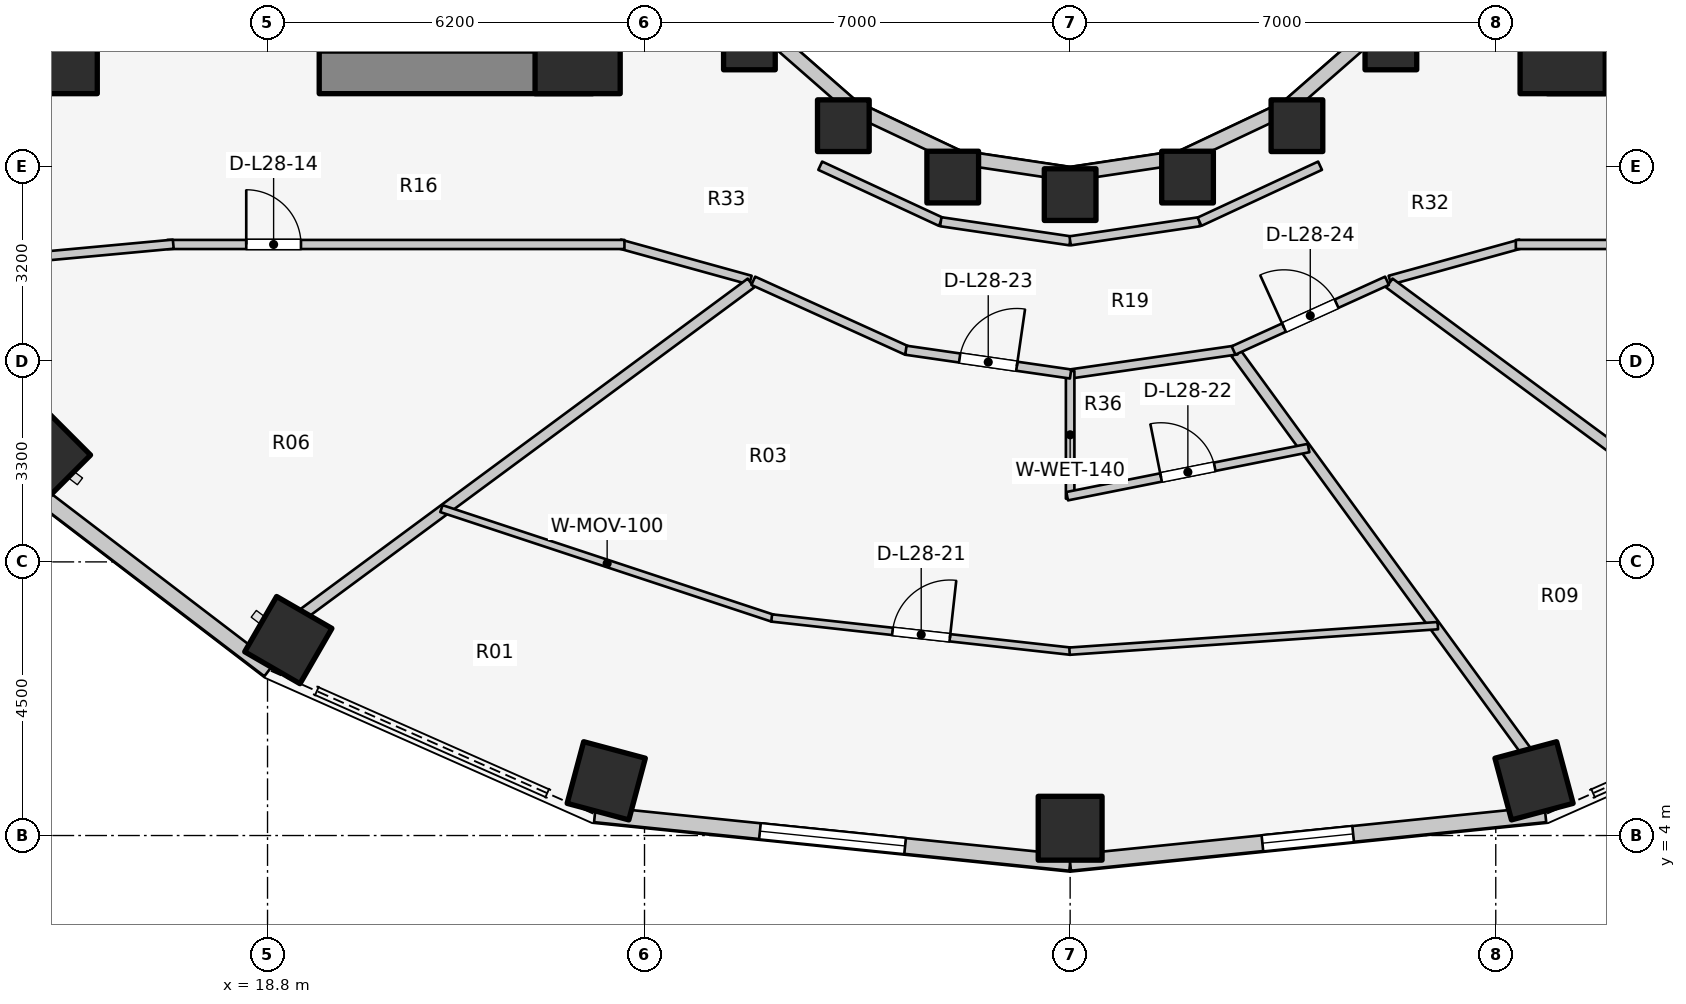
"""IFC4 building model, lengths in metres.
Left out: names, types, materials, properties, quantities, classifications, styles, units other than length and angle.
Written with IfcOpenShell. Run it as: python <this file> out.ifc"""

import sys

from ifc_helpers import new_model, si_unit, direction, frame, frame_2d, origin, origin_2d, place, context, subcontext, project, spatial, rectangle, extrude, element, fill, save


model = new_model("IFC4")
c1 = context("Model", 3, precision=1e-05, world=origin(), true_north=direction((0.0, 1.0)))
c2 = subcontext(c1, "Body", "Model", "MODEL_VIEW")
j1 = project(units=[si_unit("LENGTHUNIT", "METRE"), si_unit("PLANEANGLEUNIT", "RADIAN")], contexts=[c1])
p1 = place(None, origin())
s1 = spatial("IfcSite", under=j1, at=p1, CompositionType="ELEMENT")
p2 = place(p1, origin())
s2 = spatial("IfcBuilding", under=s1, at=p2, CompositionType="ELEMENT")
p3 = place(p2, frame((0.0, 0.0, 94.9)))
s3 = spatial("IfcBuildingStorey", under=s2, at=p3, CompositionType="ELEMENT", Elevation=94.9)
for number, where, z_axis, x_axis in (
    (1, (19.65, 16.55, 0.0), (0.0, 0.0, 1.0), (1.0, 0.0, 0.0)),
    (2, (39.85, 16.55, 0.0), (0.0, 0.0, 1.0), (1.0, 0.0, 0.0)),
):
    element("IfcWall", number, at=place(p3, frame(where, z_axis=z_axis, x_axis=x_axis)), inside=s3, PredefinedType="SHEAR", context=c2, shape_type="SweptSolid", body=[
        extrude(rectangle(XDim=4.5, YDim=0.7, at=frame_2d((2.25, 0.0))), origin(), (0.0, 0.0, 1.0), 3.1),
    ])
for number, where, z_axis, x_axis in (
    (3, (15.3, 16.9, 0.0), (0.0, 0.0, 1.0), (1.0, 0.0, 0.0)),
    (4, (23.9, 16.9, 0.0), (0.0, 0.0, 1.0), (1.0, 0.0, 0.0)),
    (5, (40.1, 16.9, 0.0), (0.0, 0.0, 1.0), (1.0, 0.0, 0.0)),
):
    element("IfcColumn", number, at=place(p3, frame(where, z_axis=z_axis, x_axis=x_axis)), inside=s3, PredefinedType="COLUMN", context=c2, shape_type="SweptSolid", body=[
        extrude(rectangle(XDim=1.4, YDim=1.4, at=origin_2d()), origin(), (0.0, 0.0, 1.0), 3.1),
    ])
p4 = place(p3, frame((26.725, 17.018, 0.0), z_axis=(0.0, 0.0, 1.0), x_axis=(1.0, 0.0, 0.0)))
e6 = element("IfcColumn", 6, at=p4, inside=s3, PredefinedType="COLUMN", context=c2, shape_type="SweptSolid", body=[
    extrude(rectangle(XDim=0.85, YDim=0.85, at=origin_2d()), origin(), (0.0, 0.0, 1.0), 3.1),
])
p5 = place(p3, frame((15.147, 10.257, 0.0), z_axis=(0.0, 0.0, 1.0), x_axis=(-0.707106781187, -0.707106781187, 0.0)))
e7 = element("IfcColumn", 7, at=p5, inside=s3, PredefinedType="COLUMN", context=c2, shape_type="SweptSolid", body=[
    extrude(rectangle(XDim=1.05, YDim=1.05, at=origin_2d()), origin(), (0.0, 0.0, 1.0), 3.1),
])
p6 = place(p3, frame((28.27, 15.673, 0.0), z_axis=(0.0, 0.0, 1.0), x_axis=(1.0, 0.0, 0.0)))
e8 = element("IfcColumn", 8, at=p6, inside=s3, PredefinedType="COLUMN", context=c2, shape_type="SweptSolid", body=[
    extrude(rectangle(XDim=0.85, YDim=0.85, at=origin_2d()), origin(), (0.0, 0.0, 1.0), 3.1),
])
p7 = place(p3, frame((19.142, 7.214, 0.0), z_axis=(0.0, 0.0, 1.0), x_axis=(-0.5, -0.866025403784, 0.0)))
e9 = element("IfcColumn", 9, at=p7, inside=s3, PredefinedType="COLUMN", context=c2, shape_type="SweptSolid", body=[
    extrude(rectangle(XDim=1.05, YDim=1.05, at=origin_2d()), origin(), (0.0, 0.0, 1.0), 3.1),
])
p8 = place(p3, frame((30.069, 14.828, 0.0), z_axis=(0.0, 0.0, 1.0), x_axis=(1.0, 0.0, 0.0)))
e10 = element("IfcColumn", 10, at=p8, inside=s3, PredefinedType="COLUMN", context=c2, shape_type="SweptSolid", body=[
    extrude(rectangle(XDim=0.85, YDim=0.85, at=origin_2d()), origin(), (0.0, 0.0, 1.0), 3.1),
])
p9 = place(p3, frame((24.371, 4.9, 0.0), z_axis=(0.0, 0.0, 1.0), x_axis=(-0.258819045103, -0.965925826289, 0.0)))
e11 = element("IfcColumn", 11, at=p9, inside=s3, PredefinedType="COLUMN", context=c2, shape_type="SweptSolid", body=[
    extrude(rectangle(XDim=1.05, YDim=1.05, at=origin_2d()), origin(), (0.0, 0.0, 1.0), 3.1),
])
p10 = place(p3, frame((32.0, 14.54, 0.0), z_axis=(0.0, 0.0, 1.0), x_axis=(1.0, 0.0, 0.0)))
e12 = element("IfcColumn", 12, at=p10, inside=s3, PredefinedType="COLUMN", context=c2, shape_type="SweptSolid", body=[
    extrude(rectangle(XDim=0.85, YDim=0.85, at=origin_2d()), origin(), (0.0, 0.0, 1.0), 3.1),
])
p11 = place(p3, frame((32.0, 4.12, 0.0), z_axis=(0.0, 0.0, 1.0), x_axis=(0.0, -1.0, 0.0)))
e13 = element("IfcColumn", 13, at=p11, inside=s3, PredefinedType="COLUMN", context=c2, shape_type="SweptSolid", body=[
    extrude(rectangle(XDim=1.05, YDim=1.05, at=origin_2d()), origin(), (0.0, 0.0, 1.0), 3.1),
])
p12 = place(p3, frame((33.931, 14.828, 0.0), z_axis=(0.0, 0.0, 1.0), x_axis=(1.0, 0.0, 0.0)))
e14 = element("IfcColumn", 14, at=p12, inside=s3, PredefinedType="COLUMN", context=c2, shape_type="SweptSolid", body=[
    extrude(rectangle(XDim=0.85, YDim=0.85, at=origin_2d()), origin(), (0.0, 0.0, 1.0), 3.1),
])
p13 = place(p3, frame((39.629, 4.9, 0.0), z_axis=(0.0, 0.0, 1.0), x_axis=(0.258819045103, -0.965925826289, 0.0)))
e15 = element("IfcColumn", 15, at=p13, inside=s3, PredefinedType="COLUMN", context=c2, shape_type="SweptSolid", body=[
    extrude(rectangle(XDim=1.05, YDim=1.05, at=origin_2d()), origin(), (0.0, 0.0, 1.0), 3.1),
])
for number, where, z_axis, x_axis in (
    (16, (35.73, 15.673, 0.0), (0.0, 0.0, 1.0), (1.0, 0.0, 0.0)),
    (17, (37.275, 17.018, 0.0), (0.0, 0.0, 1.0), (1.0, 0.0, 0.0)),
):
    element("IfcColumn", number, at=place(p3, frame(where, z_axis=z_axis, x_axis=x_axis)), inside=s3, PredefinedType="COLUMN", context=c2, shape_type="SweptSolid", body=[
        extrude(rectangle(XDim=0.85, YDim=0.85, at=origin_2d()), origin(), (0.0, 0.0, 1.0), 3.1),
    ])
p14 = place(p3, frame((26.965, 17.258, 0.0), z_axis=(0.0, 0.0, 1.0), x_axis=(0.752576694707, -0.658504607869, 0.0)))
e18 = element("IfcWall", 18, at=p14, inside=s3, PredefinedType="STANDARD", context=c2, shape_type="SweptSolid", body=[
    extrude(rectangle(XDim=1.959, YDim=0.23, at=frame_2d((0.98, 0.0))), origin(), (0.0, 0.0, 1.0), 2.16),
])
p15 = place(p3, frame((28.44, 15.968, 0.0), z_axis=(0.0, 0.0, 1.0), x_axis=(0.904179699603, -0.427152280606, 0.0)))
e19 = element("IfcWall", 19, at=p15, inside=s3, PredefinedType="STANDARD", context=c2, shape_type="SweptSolid", body=[
    extrude(rectangle(XDim=1.899, YDim=0.23, at=frame_2d((0.95, 0.0))), origin(), (0.0, 0.0, 1.0), 2.16),
])
for number, where, z_axis, x_axis in (
    (20, (30.157, 15.157, 0.0), (0.0, 0.0, 1.0), (0.989, -0.149, 0.0)),
    (21, (32.0, 14.88, 0.0), (0.0, 0.0, 1.0), (0.989, 0.149, 0.0)),
):
    element("IfcWall", number, at=place(p3, frame(where, z_axis=z_axis, x_axis=x_axis)), inside=s3, PredefinedType="STANDARD", context=c2, shape_type="SweptSolid", body=[
        extrude(rectangle(XDim=1.864, YDim=0.23, at=frame_2d((0.932, 0.0))), origin(), (0.0, 0.0, 1.0), 2.16),
    ])
p16 = place(p3, frame((33.843, 15.157, 0.0), z_axis=(0.0, 0.0, 1.0), x_axis=(0.904179699603, 0.427152280606, 0.0)))
e22 = element("IfcWall", 22, at=p16, inside=s3, PredefinedType="STANDARD", context=c2, shape_type="SweptSolid", body=[
    extrude(rectangle(XDim=1.899, YDim=0.23, at=frame_2d((0.95, 0.0))), origin(), (0.0, 0.0, 1.0), 2.16),
])
p17 = place(p3, frame((35.56, 15.968, 0.0), z_axis=(0.0, 0.0, 1.0), x_axis=(0.752576694707, 0.658504607869, 0.0)))
e23 = element("IfcWall", 23, at=p17, inside=s3, PredefinedType="STANDARD", context=c2, shape_type="SweptSolid", body=[
    extrude(rectangle(XDim=1.959, YDim=0.23, at=frame_2d((0.98, 0.0))), origin(), (0.0, 0.0, 1.0), 2.16),
])
p18 = place(p3, frame((14.734, 9.847, 0.0), z_axis=(0.0, 0.0, 1.0), x_axis=(0.794809810864, -0.606858603427, 0.0)))
e24 = element("IfcWall", 24, at=p18, inside=s3, PredefinedType="STANDARD", context=c2, shape_type="SweptSolid", body=[
    extrude(rectangle(XDim=5.149, YDim=0.26, at=frame_2d((2.575, 0.0))), origin(), (0.0, 0.0, 1.0), 2.85),
])
p19 = place(p3, frame((24.184, 4.349, 0.0), z_axis=(0.0, 0.0, 1.0), x_axis=(0.994821390558, -0.101638579726, 0.0)))
e25 = element("IfcWall", 25, at=p19, inside=s3, PredefinedType="STANDARD", context=c2, shape_type="SweptSolid", body=[
    extrude(rectangle(XDim=7.857, YDim=0.26, at=frame_2d((3.929, 0.0))), origin(), (0.0, 0.0, 1.0), 2.85),
])
p20 = place(p19, frame((2.729, 0.0, 0.75)))
e26 = element("IfcOpeningElement", 26, at=p20, cuts=e25, PredefinedType="OPENING", context=c2, shape_type="SweptSolid", body=[
    extrude(rectangle(XDim=2.4, YDim=1.7, at=frame_2d((1.2, 0.85))), frame((0.0, 0.14, 0.0), z_axis=(0.0, -1.0, 0.0), x_axis=(1.0, 0.0, 0.0)), (0.0, 0.0, 1.0), 0.28),
])
p21 = place(p3, frame((32.0, 3.551, 0.0), z_axis=(0.0, 0.0, 1.0), x_axis=(0.994821390558, 0.101638579726, 0.0)))
e27 = element("IfcWall", 27, at=p21, inside=s3, PredefinedType="STANDARD", context=c2, shape_type="SweptSolid", body=[
    extrude(rectangle(XDim=7.857, YDim=0.26, at=frame_2d((3.929, 0.0))), origin(), (0.0, 0.0, 1.0), 2.85),
])
p22 = place(p21, frame((3.178, 0.0, 0.75)))
e28 = element("IfcOpeningElement", 28, at=p22, cuts=e27, PredefinedType="OPENING", context=c2, shape_type="SweptSolid", body=[
    extrude(rectangle(XDim=1.5, YDim=1.6, at=frame_2d((0.75, 0.8))), frame((0.0, 0.14, 0.0), z_axis=(0.0, -1.0, 0.0), x_axis=(1.0, 0.0, 0.0)), (0.0, 0.0, 1.0), 0.28),
])
p23 = place(p3, frame((27.89, 15.015, 0.0), z_axis=(0.0, 0.0, 1.0), x_axis=(0.906943449489, -0.421252393975, 0.0)))
e29 = element("IfcWall", 29, at=p23, inside=s3, PredefinedType="PARTITIONING", context=c2, shape_type="SweptSolid", body=[
    extrude(rectangle(XDim=2.186, YDim=0.15, at=frame_2d((1.093, 0.0))), origin(), (0.0, 0.0, 1.0), 2.272),
])
for number, where, z_axis, x_axis in (
    (30, (29.873, 14.094, 0.0), (0.0, 0.0, 1.0), (0.989, -0.146, 0.0)),
    (31, (32.0, 13.78, 0.0), (0.0, 0.0, 1.0), (0.989, 0.146, 0.0)),
):
    element("IfcWall", number, at=place(p3, frame(where, z_axis=z_axis, x_axis=x_axis)), inside=s3, PredefinedType="PARTITIONING", context=c2, shape_type="SweptSolid", body=[
        extrude(rectangle(XDim=2.151, YDim=0.15, at=frame_2d((1.075, 0.0))), origin(), (0.0, 0.0, 1.0), 2.272),
    ])
p24 = place(p3, frame((34.127, 14.094, 0.0), z_axis=(0.0, 0.0, 1.0), x_axis=(0.906943449489, 0.421252393975, 0.0)))
e32 = element("IfcWall", 32, at=p24, inside=s3, PredefinedType="PARTITIONING", context=c2, shape_type="SweptSolid", body=[
    extrude(rectangle(XDim=2.186, YDim=0.15, at=frame_2d((1.093, 0.0))), origin(), (0.0, 0.0, 1.0), 2.272),
])
p25 = place(p3, frame((26.742, 13.133, 0.0), z_axis=(0.0, 0.0, 1.0), x_axis=(-0.963833843713, 0.266503886865, 0.0)))
e33 = element("IfcWall", 33, at=p25, inside=s3, PredefinedType="PARTITIONING", context=c2, shape_type="SweptSolid", body=[
    extrude(rectangle(XDim=2.232, YDim=0.15, at=frame_2d((1.116, 0.0))), origin(), (0.0, 0.0, 1.0), 2.272),
])
p26 = place(p3, frame((17.15, 13.72, 0.0), z_axis=(0.0, 0.0, 1.0), x_axis=(1.0, 0.0, 0.0)))
e34 = element("IfcWall", 34, at=p26, inside=s3, PredefinedType="PARTITIONING", context=c2, shape_type="SweptSolid", body=[
    extrude(rectangle(XDim=7.52, YDim=0.15, at=frame_2d((3.76, 0.0))), origin(), (0.0, 0.0, 1.0), 2.272),
])
p27 = place(p26, frame((1.3, 0.0, 0.0)))
e35 = element("IfcOpeningElement", 35, at=p27, cuts=e34, PredefinedType="OPENING", context=c2, shape_type="SweptSolid", body=[
    extrude(rectangle(XDim=0.9, YDim=2.1, at=frame_2d((0.45, 1.05))), frame((0.0, 0.085, 0.0), z_axis=(0.0, -1.0, 0.0), x_axis=(1.0, 0.0, 0.0)), (0.0, 0.0, 1.0), 0.17),
])
p28 = place(p3, frame((17.25, 13.725, 0.0), z_axis=(0.0, 0.0, 1.0), x_axis=(-0.995748209098, -0.092116795851, 0.0)))
e36 = element("IfcWall", 36, at=p28, inside=s3, PredefinedType="PARTITIONING", context=c2, shape_type="SweptSolid", body=[
    extrude(rectangle(XDim=6.112, YDim=0.15, at=frame_2d((3.056, 0.0))), origin(), (0.0, 0.0, 1.0), 2.142),
])
p29 = place(p3, frame((37.258, 13.133, 0.0), z_axis=(0.0, 0.0, 1.0), x_axis=(0.963833843713, 0.266503886865, 0.0)))
e37 = element("IfcWall", 37, at=p29, inside=s3, PredefinedType="PARTITIONING", context=c2, shape_type="SweptSolid", body=[
    extrude(rectangle(XDim=2.232, YDim=0.15, at=frame_2d((1.116, 0.0))), origin(), (0.0, 0.0, 1.0), 2.272),
])
p30 = place(p3, frame((39.33, 13.72, 0.0), z_axis=(0.0, 0.0, 1.0), x_axis=(1.0, 0.0, 0.0)))
e38 = element("IfcWall", 38, at=p30, inside=s3, PredefinedType="PARTITIONING", context=c2, shape_type="SweptSolid", body=[
    extrude(rectangle(XDim=7.52, YDim=0.15, at=frame_2d((3.76, 0.0))), origin(), (0.0, 0.0, 1.0), 2.272),
])
p31 = place(p30, frame((5.22, 0.0, 0.0)))
e39 = element("IfcOpeningElement", 39, at=p31, cuts=e38, PredefinedType="OPENING", context=c2, shape_type="SweptSolid", body=[
    extrude(rectangle(XDim=0.9, YDim=2.1, at=frame_2d((0.45, 1.05))), frame((0.0, 0.085, 0.0), z_axis=(0.0, -1.0, 0.0), x_axis=(1.0, 0.0, 0.0)), (0.0, 0.0, 1.0), 0.17),
])
p32 = place(p3, frame((26.751, 13.086, 0.0), z_axis=(0.0, 0.0, 1.0), x_axis=(-0.80430981394, -0.594210167533, 0.0)))
e40 = element("IfcWall", 40, at=p32, inside=s3, PredefinedType="PARTITIONING", context=c2, shape_type="SweptSolid", body=[
    extrude(rectangle(XDim=9.146, YDim=0.18, at=frame_2d((4.573, 0.0))), origin(), (0.0, 0.0, 1.0), 2.272),
])
p33 = place(p3, frame((34.727, 11.934, 0.0), z_axis=(0.0, 0.0, 1.0), x_axis=(0.589042211476, -0.808102266486, 0.0)))
e41 = element("IfcWall", 41, at=p33, inside=s3, PredefinedType="PARTITIONING", context=c2, shape_type="SweptSolid", body=[
    extrude(rectangle(XDim=8.101, YDim=0.18, at=frame_2d((4.051, 0.0))), origin(), (0.0, 0.0, 1.0), 2.272),
])
p34 = place(p3, frame((37.249, 13.086, 0.0), z_axis=(0.0, 0.0, 1.0), x_axis=(0.80430981394, -0.594210167533, 0.0)))
e42 = element("IfcWall", 42, at=p34, inside=s3, PredefinedType="PARTITIONING", context=c2, shape_type="SweptSolid", body=[
    extrude(rectangle(XDim=9.146, YDim=0.18, at=frame_2d((4.573, 0.0))), origin(), (0.0, 0.0, 1.0), 2.272),
])
p35 = place(p3, frame((21.66, 9.376, 0.0), z_axis=(0.0, 0.0, 1.0), x_axis=(0.949429126756, -0.313981421852, 0.0)))
e43 = element("IfcWall", 43, at=p35, inside=s3, PredefinedType="MOVABLE", context=c2, shape_type="SweptSolid", body=[
    extrude(rectangle(XDim=5.741, YDim=0.12, at=frame_2d((2.87, 0.0))), origin(), (0.0, 0.0, 1.0), 2.272),
])
p36 = place(p3, frame((27.091, 7.578, 0.0), z_axis=(0.0, 0.0, 1.0), x_axis=(0.993892154322, -0.110355722898, 0.0)))
e44 = element("IfcWall", 44, at=p36, inside=s3, PredefinedType="MOVABLE", context=c2, shape_type="SweptSolid", body=[
    extrude(rectangle(XDim=4.949, YDim=0.12, at=frame_2d((2.475, 0.0))), origin(), (0.0, 0.0, 1.0), 2.272),
])
p37 = place(p36, frame((2.0, 0.0, 0.0)))
e45 = element("IfcOpeningElement", 45, at=p37, cuts=e44, PredefinedType="OPENING", context=c2, shape_type="SweptSolid", body=[
    extrude(rectangle(XDim=0.95, YDim=2.1, at=frame_2d((0.475, 1.05))), frame((0.0, 0.07, 0.0), z_axis=(0.0, -1.0, 0.0), x_axis=(1.0, 0.0, 0.0)), (0.0, 0.0, 1.0), 0.14),
])
p38 = place(p3, frame((31.99, 7.032, 0.0), z_axis=(0.0, 0.0, 1.0), x_axis=(0.997605327057, 0.06916365684, 0.0)))
e46 = element("IfcWall", 46, at=p38, inside=s3, PredefinedType="MOVABLE", context=c2, shape_type="SweptSolid", body=[
    extrude(rectangle(XDim=6.072, YDim=0.12, at=frame_2d((3.036, 0.0))), origin(), (0.0, 0.0, 1.0), 2.272),
])
p39 = place(p3, frame((31.95, 11.583, 0.0), z_axis=(0.0, 0.0, 1.0), x_axis=(0.989761784218, 0.142729150844, 0.0)))
e47 = element("IfcWall", 47, at=p39, inside=s3, PredefinedType="PARTITIONING", context=c2, shape_type="SweptSolid", body=[
    extrude(rectangle(XDim=2.822, YDim=0.15, at=frame_2d((1.411, 0.0))), origin(), (0.0, 0.0, 1.0), 2.272),
])
p40 = place(p3, frame((32.0, 11.64, 0.0), z_axis=(0.0, 0.0, 1.0), x_axis=(0.0, -1.0, 0.0)))
e48 = element("IfcWall", 48, at=p40, inside=s3, PredefinedType="PLUMBINGWALL", context=c2, shape_type="SweptSolid", body=[
    extrude(rectangle(XDim=2.1, YDim=0.14, at=frame_2d((1.05, 0.0))), origin(), (0.0, 0.0, 1.0), 2.272),
])
p41 = place(p3, frame((31.951, 9.58, 0.0), z_axis=(0.0, 0.0, 1.0), x_axis=(0.980668708329, 0.195675457082, 0.0)))
e49 = element("IfcWall", 49, at=p41, inside=s3, PredefinedType="PLUMBINGWALL", context=c2, shape_type="SweptSolid", body=[
    extrude(rectangle(XDim=4.049, YDim=0.14, at=frame_2d((2.024, 0.0))), origin(), (0.0, 0.0, 1.0), 2.272),
])
p42 = place(p41, frame((1.574, 0.0, 0.0)))
e50 = element("IfcOpeningElement", 50, at=p42, cuts=e49, PredefinedType="OPENING", context=c2, shape_type="SweptSolid", body=[
    extrude(rectangle(XDim=0.9, YDim=2.1, at=frame_2d((0.45, 1.05))), frame((0.0, 0.08, 0.0), z_axis=(0.0, -1.0, 0.0), x_axis=(1.0, 0.0, 0.0)), (0.0, 0.0, 1.0), 0.16),
])
p43 = place(p3, frame((26.789, 13.123, 0.0), z_axis=(0.0, 0.0, 1.0), x_axis=(0.910568469686, -0.41335827319, 0.0)))
e51 = element("IfcWall", 51, at=p43, inside=s3, PredefinedType="PARTITIONING", context=c2, shape_type="SweptSolid", body=[
    extrude(rectangle(XDim=2.772, YDim=0.15, at=frame_2d((1.386, 0.0))), origin(), (0.0, 0.0, 1.0), 2.272),
])
p44 = place(p3, frame((29.299, 11.981, 0.0), z_axis=(0.0, 0.0, 1.0), x_axis=(0.989748682384, -0.142819976611, 0.0)))
e52 = element("IfcWall", 52, at=p44, inside=s3, PredefinedType="PARTITIONING", context=c2, shape_type="SweptSolid", body=[
    extrude(rectangle(XDim=2.737, YDim=0.15, at=frame_2d((1.368, 0.0))), origin(), (0.0, 0.0, 1.0), 2.272),
])
p45 = place(p44, frame((0.893, 0.0, 0.0)))
e53 = element("IfcOpeningElement", 53, at=p45, cuts=e52, PredefinedType="OPENING", context=c2, shape_type="SweptSolid", body=[
    extrude(rectangle(XDim=0.95, YDim=2.1, at=frame_2d((0.475, 1.05))), frame((0.0, 0.085, 0.0), z_axis=(0.0, -1.0, 0.0), x_axis=(1.0, 0.0, 0.0)), (0.0, 0.0, 1.0), 0.17),
])
p46 = place(p3, frame((34.687, 11.977, 0.0), z_axis=(0.0, 0.0, 1.0), x_axis=(0.910568469686, 0.41335827319, 0.0)))
e54 = element("IfcWall", 54, at=p46, inside=s3, PredefinedType="PARTITIONING", context=c2, shape_type="SweptSolid", body=[
    extrude(rectangle(XDim=2.772, YDim=0.15, at=frame_2d((1.386, 0.0))), origin(), (0.0, 0.0, 1.0), 2.272),
])
p47 = place(p46, frame((0.911, 0.0, 0.0)))
e55 = element("IfcOpeningElement", 55, at=p47, cuts=e54, PredefinedType="OPENING", context=c2, shape_type="SweptSolid", body=[
    extrude(rectangle(XDim=0.95, YDim=2.1, at=frame_2d((0.475, 1.05))), frame((0.0, 0.085, 0.0), z_axis=(0.0, -1.0, 0.0), x_axis=(1.0, 0.0, 0.0)), (0.0, 0.0, 1.0), 0.17),
])
p48 = place(p20, origin())
e56 = element("IfcWindow", 56, at=p48, inside=s3, PartitioningType="SINGLE_PANEL", PredefinedType="WINDOW", context=c2, shape_type="SweptSolid", body=[
    extrude(rectangle(XDim=2.4, YDim=1.7, at=frame_2d((1.2, 0.85))), frame((0.0, 0.03, 0.0), z_axis=(0.0, -1.0, 0.0), x_axis=(1.0, 0.0, 0.0)), (0.0, 0.0, 1.0), 0.06),
])
fill(e26, e56)
p49 = place(p22, origin())
e57 = element("IfcWindow", 57, at=p49, inside=s3, PartitioningType="SINGLE_PANEL", PredefinedType="WINDOW", context=c2, shape_type="SweptSolid", body=[
    extrude(rectangle(XDim=1.5, YDim=1.6, at=frame_2d((0.75, 0.8))), frame((0.0, 0.03, 0.0), z_axis=(0.0, -1.0, 0.0), x_axis=(1.0, 0.0, 0.0)), (0.0, 0.0, 1.0), 0.06),
])
fill(e28, e57)
p50 = place(p27, origin())
e58 = element("IfcDoor", 58, at=p50, inside=s3, OperationType="SINGLE_SWING_LEFT", PredefinedType="DOOR", context=c2, shape_type="SweptSolid", body=[
    extrude(rectangle(XDim=0.9, YDim=2.1, at=frame_2d((0.45, 1.05))), frame((0.0, 0.025, 0.0), z_axis=(0.0, -1.0, 0.0), x_axis=(1.0, 0.0, 0.0)), (0.0, 0.0, 1.0), 0.05),
])
fill(e35, e58)
p51 = place(p37, origin())
e59 = element("IfcDoor", 59, at=p51, inside=s3, OperationType="SINGLE_SWING_RIGHT", PredefinedType="DOOR", context=c2, shape_type="SweptSolid", body=[
    extrude(rectangle(XDim=0.95, YDim=2.1, at=frame_2d((0.475, 1.05))), frame((0.0, 0.025, 0.0), z_axis=(0.0, -1.0, 0.0), x_axis=(1.0, 0.0, 0.0)), (0.0, 0.0, 1.0), 0.05),
])
fill(e45, e59)
p52 = place(p42, origin())
e60 = element("IfcDoor", 60, at=p52, inside=s3, OperationType="SINGLE_SWING_LEFT", PredefinedType="DOOR", context=c2, shape_type="SweptSolid", body=[
    extrude(rectangle(XDim=0.9, YDim=2.1, at=frame_2d((0.45, 1.05))), frame((0.0, 0.025, 0.0), z_axis=(0.0, -1.0, 0.0), x_axis=(1.0, 0.0, 0.0)), (0.0, 0.0, 1.0), 0.05),
])
fill(e50, e60)
p53 = place(p45, origin())
e61 = element("IfcDoor", 61, at=p53, inside=s3, OperationType="SINGLE_SWING_RIGHT", PredefinedType="DOOR", context=c2, shape_type="SweptSolid", body=[
    extrude(rectangle(XDim=0.95, YDim=2.1, at=frame_2d((0.475, 1.05))), frame((0.0, 0.025, 0.0), z_axis=(0.0, -1.0, 0.0), x_axis=(1.0, 0.0, 0.0)), (0.0, 0.0, 1.0), 0.05),
])
fill(e53, e61)
p54 = place(p47, origin())
e62 = element("IfcDoor", 62, at=p54, inside=s3, OperationType="SINGLE_SWING_LEFT", PredefinedType="DOOR", context=c2, shape_type="SweptSolid", body=[
    extrude(rectangle(XDim=0.95, YDim=2.1, at=frame_2d((0.475, 1.05))), frame((0.0, 0.025, 0.0), z_axis=(0.0, -1.0, 0.0), x_axis=(1.0, 0.0, 0.0)), (0.0, 0.0, 1.0), 0.05),
])
fill(e55, e62)
save(model, sys.argv[1])
